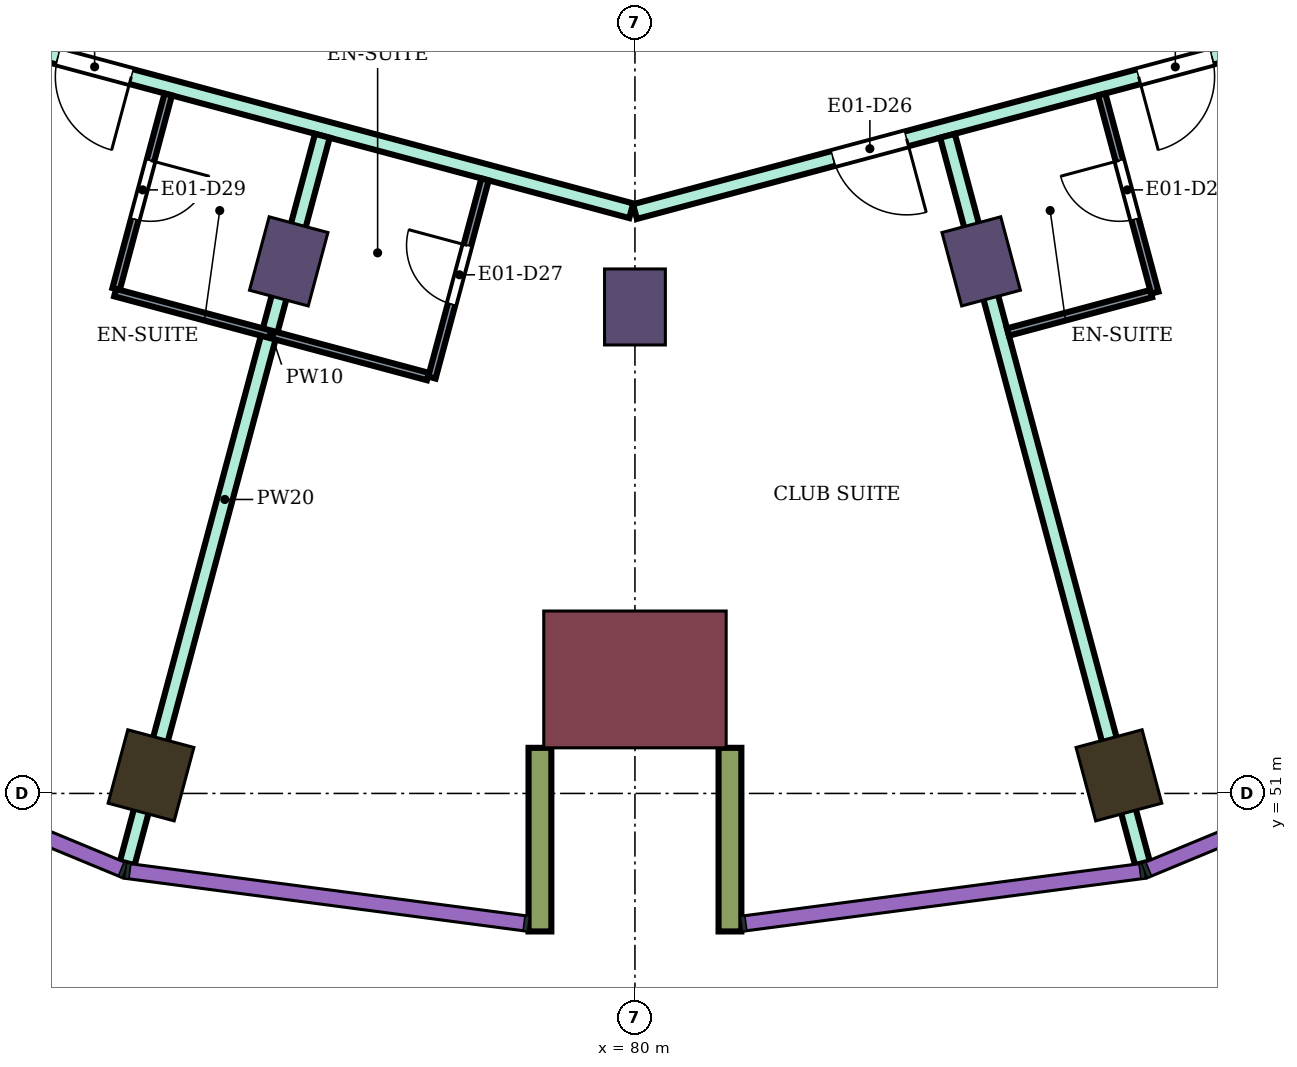
"""IFC4 building model, lengths in metres.
Left out: names, types, materials, properties, quantities, classifications, styles, units other than length and angle.
Written with IfcOpenShell. Run it as: python <this file> out.ifc"""

import sys

from ifc_helpers import new_model, si_unit, direction, frame, frame_2d, origin, origin_2d, place, context, subcontext, project, spatial, rectangle, extrude, element, fill, save


model = new_model("IFC4")
c1 = context("Model", 3, precision=1e-05, world=origin(), true_north=direction((0.0, 1.0)))
c2 = subcontext(c1, "Body", "Model", "MODEL_VIEW")
j1 = project(units=[si_unit("LENGTHUNIT", "METRE"), si_unit("PLANEANGLEUNIT", "RADIAN")], contexts=[c1])
p1 = place(None, origin())
s1 = spatial("IfcSite", under=j1, at=p1, CompositionType="ELEMENT")
p2 = place(p1, origin())
s2 = spatial("IfcBuilding", under=s1, at=p2, CompositionType="ELEMENT")
p3 = place(p2, frame((0.0, 0.0, 114.6)))
s3 = spatial("IfcBuildingStorey", under=s2, at=p3, CompositionType="ELEMENT", Elevation=114.6)
for number, where, z_axis, x_axis in (
    (1, (73.633, 51.238, 0.0), (0.0, 0.0, 1.0), (-0.259, -0.966, 0.0)),
    (2, (86.367, 51.238, 0.0), (0.0, 0.0, 1.0), (0.259, -0.966, 0.0)),
):
    element("IfcColumn", number, at=place(p3, frame(where, z_axis=z_axis, x_axis=x_axis)), inside=s3, PredefinedType="COLUMN", context=c2, shape_type="SweptSolid", body=[
        extrude(rectangle(XDim=1.0, YDim=0.9, at=origin_2d()), origin(), (0.0, 0.0, 1.0), 3.9),
    ])
for number, where, z_axis, x_axis in (
    (3, (75.445, 58.0, 0.0), (0.0, 0.0, 1.0), (-0.259, -0.966, 0.0)),
    (4, (80.0, 57.4, 0.0), (0.0, 0.0, 1.0), (0.0, -1.0, 0.0)),
    (5, (84.555, 58.0, 0.0), (0.0, 0.0, 1.0), (0.259, -0.966, 0.0)),
):
    element("IfcColumn", number, at=place(p3, frame(where, z_axis=z_axis, x_axis=x_axis)), inside=s3, PredefinedType="COLUMN", context=c2, shape_type="SweptSolid", body=[
        extrude(rectangle(XDim=1.0, YDim=0.8, at=origin_2d()), origin(), (0.0, 0.0, 1.0), 3.9),
    ])
p4 = place(p3, frame((80.0, 52.5, 0.0), z_axis=(0.0, 0.0, 1.0), x_axis=(0.0, -1.0, 0.0)))
e6 = element("IfcColumn", 6, at=p4, inside=s3, PredefinedType="COLUMN", context=c2, shape_type="SweptSolid", body=[
    extrude(rectangle(XDim=1.8, YDim=2.4, at=origin_2d()), origin(), (0.0, 0.0, 1.0), 3.9),
])
for number, where, z_axis, x_axis in (
    (7, (78.75, 51.6, 0.0), (0.0, 0.0, 1.0), (0.0, -1.0, 0.0)),
    (8, (81.25, 51.6, 0.0), (0.0, 0.0, 1.0), (0.0, -1.0, 0.0)),
):
    element("IfcWall", number, at=place(p3, frame(where, z_axis=z_axis, x_axis=x_axis)), inside=s3, PredefinedType="NOTDEFINED", context=c2, shape_type="SweptSolid", body=[
        extrude(rectangle(XDim=2.416, YDim=0.3, at=frame_2d((1.208, 0.0))), origin(), (0.0, 0.0, 1.0), 3.9),
    ])
p5 = place(p3, frame((71.877, 60.832, 0.0), z_axis=(0.0, 0.0, 1.0), x_axis=(0.965857276008, -0.259074742848, 0.0)))
e9 = element("IfcWall", 9, at=p5, inside=s3, PredefinedType="PARTITIONING", context=c2, shape_type="SweptSolid", body=[
    extrude(rectangle(XDim=8.36, YDim=0.2, at=frame_2d((4.18, 0.0))), origin(), (0.0, 0.0, 1.0), 3.45),
])
p6 = place(p5, frame((0.55, 0.0, 0.0)))
e10 = element("IfcOpeningElement", 10, at=p6, cuts=e9, PredefinedType="OPENING", context=c2, shape_type="SweptSolid", body=[
    extrude(rectangle(XDim=1.0, YDim=2.1, at=frame_2d((0.5, 1.05))), frame((0.0, 0.11, 0.0), z_axis=(0.0, -1.0, 0.0), x_axis=(1.0, 0.0, 0.0)), (0.0, 0.0, 1.0), 0.22),
])
p7 = place(p3, frame((73.321, 50.082, 0.0), z_axis=(0.0, 0.0, 1.0), x_axis=(0.259057928998, 0.96586178588, 0.0)))
e11 = element("IfcWall", 11, at=p7, inside=s3, PredefinedType="PARTITIONING", context=c2, shape_type="SweptSolid", body=[
    extrude(rectangle(XDim=9.909, YDim=0.2, at=frame_2d((4.954, 0.0))), origin(), (0.0, 0.0, 1.0), 3.45),
])
p8 = place(p3, frame((80.0, 58.655, 0.0), z_axis=(0.0, 0.0, 1.0), x_axis=(0.965967338894, 0.258664068224, 0.0)))
e12 = element("IfcWall", 12, at=p8, inside=s3, PredefinedType="PARTITIONING", context=c2, shape_type="SweptSolid", body=[
    extrude(rectangle(XDim=8.36, YDim=0.2, at=frame_2d((4.18, 0.0))), origin(), (0.0, 0.0, 1.0), 3.45),
])
p9 = place(p8, frame((6.86, 0.0, 0.0)))
e13 = element("IfcOpeningElement", 13, at=p9, cuts=e12, PredefinedType="OPENING", context=c2, shape_type="SweptSolid", body=[
    extrude(rectangle(XDim=1.0, YDim=2.1, at=frame_2d((0.5, 1.05))), frame((0.0, 0.11, 0.0), z_axis=(0.0, -1.0, 0.0), x_axis=(1.0, 0.0, 0.0)), (0.0, 0.0, 1.0), 0.22),
])
p10 = place(p8, frame((2.7, 0.0, 0.0)))
e14 = element("IfcOpeningElement", 14, at=p10, cuts=e12, PredefinedType="OPENING", context=c2, shape_type="SweptSolid", body=[
    extrude(rectangle(XDim=1.0, YDim=2.1, at=frame_2d((0.5, 1.05))), frame((0.0, 0.11, 0.0), z_axis=(0.0, -1.0, 0.0), x_axis=(1.0, 0.0, 0.0)), (0.0, 0.0, 1.0), 0.22),
])
p11 = place(p3, frame((84.112, 59.652, 0.0), z_axis=(0.0, 0.0, 1.0), x_axis=(0.258838718107, -0.965920554709, 0.0)))
e15 = element("IfcWall", 15, at=p11, inside=s3, PredefinedType="PARTITIONING", context=c2, shape_type="SweptSolid", body=[
    extrude(rectangle(XDim=9.908, YDim=0.2, at=frame_2d((4.954, 0.0))), origin(), (0.0, 0.0, 1.0), 3.45),
])
p12 = place(p3, frame((73.174, 57.636, 0.0), z_axis=(0.0, 0.0, 1.0), x_axis=(0.258952498977, 0.96589005755, 0.0)))
e16 = element("IfcWall", 16, at=p12, inside=s3, PredefinedType="PARTITIONING", context=c2, shape_type="SweptSolid", body=[
    extrude(rectangle(XDim=2.65, YDim=0.1, at=frame_2d((1.325, 0.0))), origin(), (0.0, 0.0, 1.0), 3.45),
])
p13 = place(p12, frame((0.95, 0.0, 0.0)))
e17 = element("IfcOpeningElement", 17, at=p13, cuts=e16, PredefinedType="OPENING", context=c2, shape_type="SweptSolid", body=[
    extrude(rectangle(XDim=0.8, YDim=2.1, at=frame_2d((0.4, 1.05))), frame((0.0, 0.06, 0.0), z_axis=(0.0, -1.0, 0.0), x_axis=(1.0, 0.0, 0.0)), (0.0, 0.0, 1.0), 0.12),
])
p14 = place(p3, frame((73.161, 57.588, 0.0), z_axis=(0.0, 0.0, 1.0), x_axis=(0.965858226827, -0.259071198071, 0.0)))
e18 = element("IfcWall", 18, at=p14, inside=s3, PredefinedType="PARTITIONING", context=c2, shape_type="SweptSolid", body=[
    extrude(rectangle(XDim=4.26, YDim=0.1, at=frame_2d((2.13, 0.0))), origin(), (0.0, 0.0, 1.0), 3.45),
])
p15 = place(p3, frame((77.329, 56.471, 0.0), z_axis=(0.0, 0.0, 1.0), x_axis=(0.259013334072, 0.965873745773, 0.0)))
e19 = element("IfcWall", 19, at=p15, inside=s3, PredefinedType="PARTITIONING", context=c2, shape_type="SweptSolid", body=[
    extrude(rectangle(XDim=2.699, YDim=0.1, at=frame_2d((1.35, 0.0))), origin(), (0.0, 0.0, 1.0), 3.45),
])
p16 = place(p15, frame((1.0, 0.0, 0.0)))
e20 = element("IfcOpeningElement", 20, at=p16, cuts=e19, PredefinedType="OPENING", context=c2, shape_type="SweptSolid", body=[
    extrude(rectangle(XDim=0.8, YDim=2.1, at=frame_2d((0.4, 1.05))), frame((0.0, 0.06, 0.0), z_axis=(0.0, -1.0, 0.0), x_axis=(1.0, 0.0, 0.0)), (0.0, 0.0, 1.0), 0.12),
])
p17 = place(p3, frame((84.908, 57.07, 0.0), z_axis=(0.0, 0.0, 1.0), x_axis=(0.965853538138, 0.25908867761, 0.0)))
e21 = element("IfcWall", 21, at=p17, inside=s3, PredefinedType="PARTITIONING", context=c2, shape_type="SweptSolid", body=[
    extrude(rectangle(XDim=1.95, YDim=0.1, at=frame_2d((0.975, 0.0))), origin(), (0.0, 0.0, 1.0), 3.45),
])
p18 = place(p3, frame((86.14, 60.196, 0.0), z_axis=(0.0, 0.0, 1.0), x_axis=(0.258945475746, -0.965891940432, 0.0)))
e22 = element("IfcWall", 22, at=p18, inside=s3, PredefinedType="PARTITIONING", context=c2, shape_type="SweptSolid", body=[
    extrude(rectangle(XDim=2.7, YDim=0.1, at=frame_2d((1.35, 0.0))), origin(), (0.0, 0.0, 1.0), 3.45),
])
p19 = place(p18, frame((0.9, 0.0, 0.0)))
e23 = element("IfcOpeningElement", 23, at=p19, cuts=e22, PredefinedType="OPENING", context=c2, shape_type="SweptSolid", body=[
    extrude(rectangle(XDim=0.8, YDim=2.1, at=frame_2d((0.4, 1.05))), frame((0.0, 0.06, 0.0), z_axis=(0.0, -1.0, 0.0), x_axis=(1.0, 0.0, 0.0)), (0.0, 0.0, 1.0), 0.12),
])
p20 = place(p9, frame((1.0, 0.0, 0.0), z_axis=(0.0, 0.0, 1.0), x_axis=(-1.0, 0.0, 0.0)))
e24 = element("IfcDoor", 24, at=p20, inside=s3, OperationType="SINGLE_SWING_RIGHT", PredefinedType="DOOR", context=c2, shape_type="SweptSolid", body=[
    extrude(rectangle(XDim=1.0, YDim=2.1, at=frame_2d((0.5, 1.05))), frame((0.0, 0.025, 0.0), z_axis=(0.0, -1.0, 0.0), x_axis=(1.0, 0.0, 0.0)), (0.0, 0.0, 1.0), 0.05),
])
fill(e13, e24)
p21 = place(p19, frame((0.8, 0.0, 0.0), z_axis=(0.0, 0.0, 1.0), x_axis=(-1.0, 0.0, 0.0)))
e25 = element("IfcDoor", 25, at=p21, inside=s3, OperationType="SINGLE_SWING_RIGHT", PredefinedType="DOOR", context=c2, shape_type="SweptSolid", body=[
    extrude(rectangle(XDim=0.8, YDim=2.1, at=frame_2d((0.4, 1.05))), frame((0.0, 0.025, 0.0), z_axis=(0.0, -1.0, 0.0), x_axis=(1.0, 0.0, 0.0)), (0.0, 0.0, 1.0), 0.05),
])
fill(e23, e25)
p22 = place(p10, frame((1.0, 0.0, 0.0), z_axis=(0.0, 0.0, 1.0), x_axis=(-1.0, 0.0, 0.0)))
e26 = element("IfcDoor", 26, at=p22, inside=s3, OperationType="SINGLE_SWING_LEFT", PredefinedType="DOOR", context=c2, shape_type="SweptSolid", body=[
    extrude(rectangle(XDim=1.0, YDim=2.1, at=frame_2d((0.5, 1.05))), frame((0.0, 0.025, 0.0), z_axis=(0.0, -1.0, 0.0), x_axis=(1.0, 0.0, 0.0)), (0.0, 0.0, 1.0), 0.05),
])
fill(e14, e26)
p23 = place(p16, origin())
e27 = element("IfcDoor", 27, at=p23, inside=s3, OperationType="SINGLE_SWING_RIGHT", PredefinedType="DOOR", context=c2, shape_type="SweptSolid", body=[
    extrude(rectangle(XDim=0.8, YDim=2.1, at=frame_2d((0.4, 1.05))), frame((0.0, 0.025, 0.0), z_axis=(0.0, -1.0, 0.0), x_axis=(1.0, 0.0, 0.0)), (0.0, 0.0, 1.0), 0.05),
])
fill(e20, e27)
p24 = place(p6, frame((1.0, 0.0, 0.0), z_axis=(0.0, 0.0, 1.0), x_axis=(-1.0, 0.0, 0.0)))
e28 = element("IfcDoor", 28, at=p24, inside=s3, OperationType="SINGLE_SWING_LEFT", PredefinedType="DOOR", context=c2, shape_type="SweptSolid", body=[
    extrude(rectangle(XDim=1.0, YDim=2.1, at=frame_2d((0.5, 1.05))), frame((0.0, 0.025, 0.0), z_axis=(0.0, -1.0, 0.0), x_axis=(1.0, 0.0, 0.0)), (0.0, 0.0, 1.0), 0.05),
])
fill(e10, e28)
p25 = place(p13, frame((0.8, 0.0, 0.0), z_axis=(0.0, 0.0, 1.0), x_axis=(-1.0, 0.0, 0.0)))
e29 = element("IfcDoor", 29, at=p25, inside=s3, OperationType="SINGLE_SWING_LEFT", PredefinedType="DOOR", context=c2, shape_type="SweptSolid", body=[
    extrude(rectangle(XDim=0.8, YDim=2.1, at=frame_2d((0.4, 1.05))), frame((0.0, 0.025, 0.0), z_axis=(0.0, -1.0, 0.0), x_axis=(1.0, 0.0, 0.0)), (0.0, 0.0, 1.0), 0.05),
])
fill(e17, e29)
save(model, sys.argv[1])
